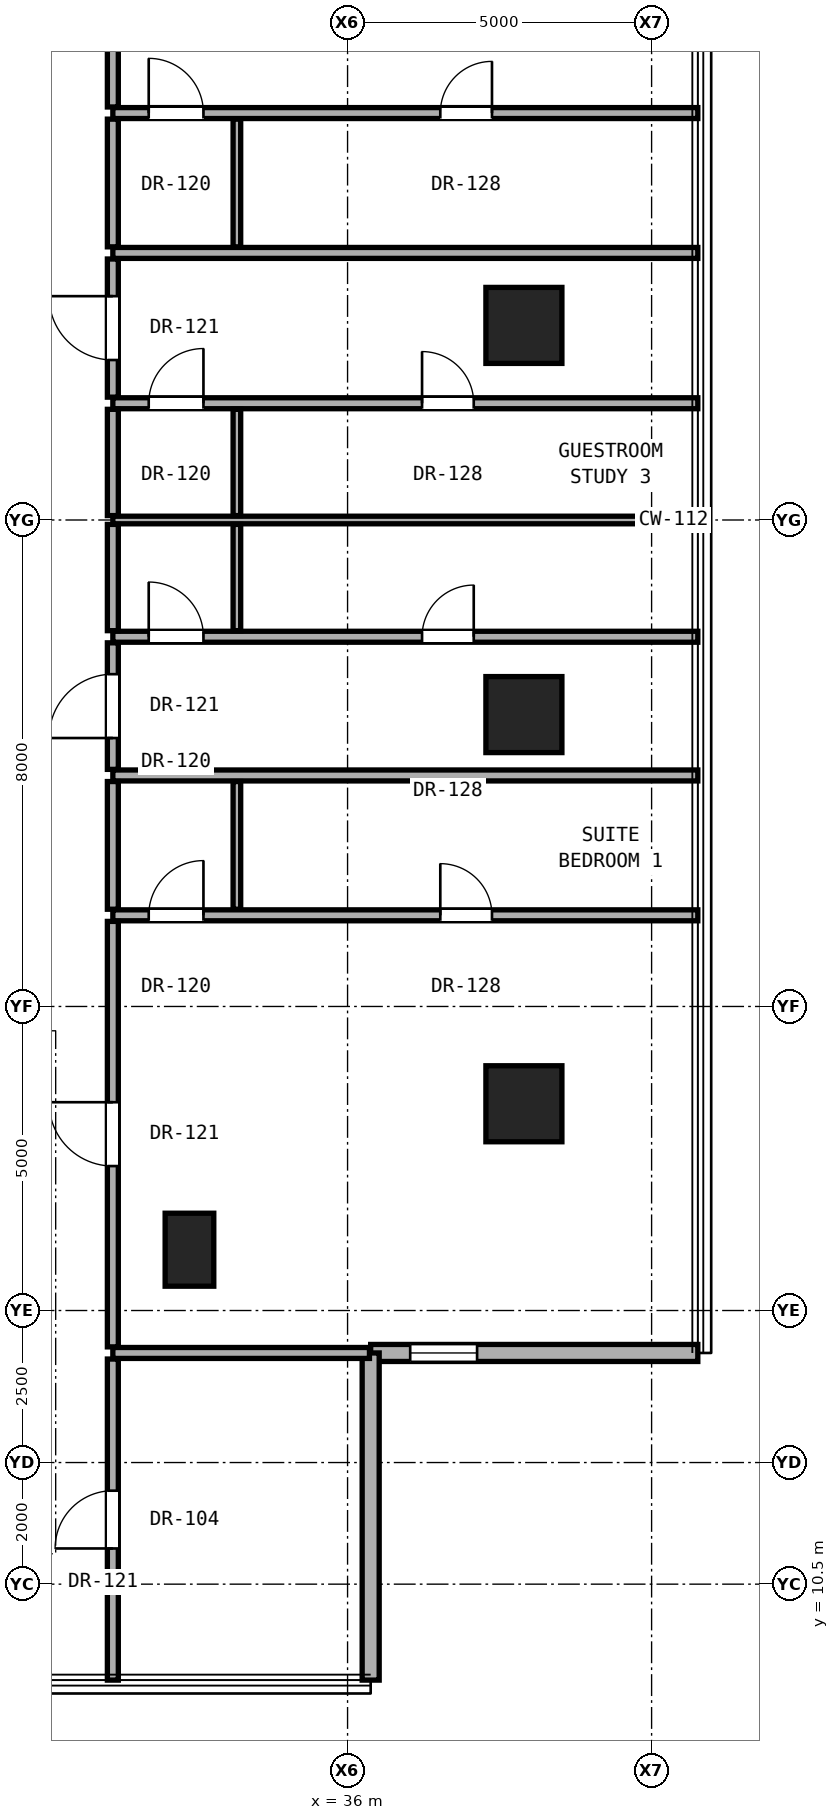
"""IFC4 building model, lengths in metres.
Left out: names, types, materials, properties, quantities, classifications, styles, units other than length and angle.
Written with IfcOpenShell. Run it as: python <this file> out.ifc"""

import sys

from ifc_helpers import new_model, si_unit, direction, frame, frame_2d, origin, origin_2d, place, context, subcontext, project, spatial, rectangle, hollow_rectangle, extrude, element, fill, save


model = new_model("IFC4")
c1 = context("Model", 3, precision=1e-05, world=origin(), true_north=direction((0.0, 1.0)))
c2 = subcontext(c1, "Body", "Model", "MODEL_VIEW")
j1 = project(units=[si_unit("LENGTHUNIT", "METRE"), si_unit("PLANEANGLEUNIT", "RADIAN")], contexts=[c1])
p1 = place(None, origin())
s1 = spatial("IfcSite", under=j1, at=p1, CompositionType="ELEMENT")
p2 = place(p1, origin())
s2 = spatial("IfcBuilding", under=s1, at=p2, CompositionType="ELEMENT")
p3 = place(p2, frame((0.0, 0.0, 25.7)))
s3 = spatial("IfcBuildingStorey", under=s2, at=p3, CompositionType="ELEMENT", Elevation=25.7)
for number, where, z_axis, x_axis in (
    (1, (38.9, 18.4, 0.0), (0.0, 0.0, 1.0), (1.0, 0.0, 0.0)),
    (2, (38.9, 24.8, 0.0), (0.0, 0.0, 1.0), (1.0, 0.0, 0.0)),
    (3, (38.9, 31.2, 0.0), (0.0, 0.0, 1.0), (1.0, 0.0, 0.0)),
):
    element("IfcColumn", number, at=place(p3, frame(where, z_axis=z_axis, x_axis=x_axis)), inside=s3, PredefinedType="COLUMN", context=c2, shape_type="SweptSolid", body=[
        extrude(hollow_rectangle(XDim=1.25, YDim=1.25, WallThickness=0.07, at=origin_2d()), origin(), (0.0, 0.0, 1.0), 3.3),
    ])
p4 = place(p3, frame((33.4, 16.0, 0.0), z_axis=(0.0, 0.0, 1.0), x_axis=(1.0, 0.0, 0.0)))
e4 = element("IfcColumn", 4, at=p4, inside=s3, PredefinedType="PILASTER", context=c2, shape_type="SweptSolid", body=[
    extrude(rectangle(XDim=0.8, YDim=1.2, at=origin_2d()), origin(), (0.0, 0.0, 1.0), 3.3),
])
p5 = place(p3, frame((36.38, 14.302, 0.0), z_axis=(0.0, 0.0, 1.0), x_axis=(1.0, 0.0, 0.0)))
e5 = element("IfcWall", 5, at=p5, inside=s3, PredefinedType="SOLIDWALL", context=c2, shape_type="SweptSolid", body=[
    extrude(rectangle(XDim=5.38, YDim=0.28, at=frame_2d((2.69, 0.0))), origin(), (0.0, 0.0, 1.0), 3.04),
])
p6 = place(p5, frame((0.65, 0.0, 0.85)))
e6 = element("IfcOpeningElement", 6, at=p6, cuts=e5, PredefinedType="OPENING", context=c2, shape_type="SweptSolid", body=[
    extrude(rectangle(XDim=1.1, YDim=2.0, at=frame_2d((0.55, 1.0))), frame((0.0, 0.15, 0.0), z_axis=(0.0, -1.0, 0.0), x_axis=(1.0, 0.0, 0.0)), (0.0, 0.0, 1.0), 0.3),
])
p7 = place(p3, frame((36.38, 8.922, 0.0), z_axis=(0.0, 0.0, 1.0), x_axis=(0.0, 1.0, 0.0)))
e7 = element("IfcWall", 7, at=p7, inside=s3, PredefinedType="SOLIDWALL", context=c2, shape_type="SweptSolid", body=[
    extrude(rectangle(XDim=5.38, YDim=0.28, at=frame_2d((2.69, 0.0))), origin(), (0.0, 0.0, 1.0), 3.04),
])
p8 = place(p3, frame((32.14, 14.302, 0.0), z_axis=(0.0, 0.0, 1.0), x_axis=(1.0, 0.0, 0.0)))
e8 = element("IfcWall", 8, at=p8, inside=s3, PredefinedType="PARTITIONING", context=c2, shape_type="SweptSolid", body=[
    extrude(rectangle(XDim=4.22, YDim=0.18, at=frame_2d((2.11, 0.0))), origin(), (0.0, 0.0, 1.0), 3.06),
])
p9 = place(p3, frame((32.14, 21.499, 0.0), z_axis=(0.0, 0.0, 1.0), x_axis=(1.0, 0.0, 0.0)))
e9 = element("IfcWall", 9, at=p9, inside=s3, PredefinedType="PARTITIONING", context=c2, shape_type="SweptSolid", body=[
    extrude(rectangle(XDim=9.62, YDim=0.18, at=frame_2d((4.81, 0.0))), origin(), (0.0, 0.0, 1.0), 2.125),
])
p10 = place(p9, frame((5.385, 0.0, 0.0)))
e10 = element("IfcOpeningElement", 10, at=p10, cuts=e9, PredefinedType="OPENING", context=c2, shape_type="SweptSolid", body=[
    extrude(rectangle(XDim=0.85, YDim=2.01, at=frame_2d((0.425, 1.005))), frame((0.0, 0.1, 0.0), z_axis=(0.0, -1.0, 0.0), x_axis=(1.0, 0.0, 0.0)), (0.0, 0.0, 1.0), 0.2),
])
p11 = place(p9, frame((0.59, 0.0, 0.0)))
e11 = element("IfcOpeningElement", 11, at=p11, cuts=e9, PredefinedType="OPENING", context=c2, shape_type="SweptSolid", body=[
    extrude(rectangle(XDim=0.9, YDim=2.1, at=frame_2d((0.45, 1.05))), frame((0.0, 0.1, 0.0), z_axis=(0.0, -1.0, 0.0), x_axis=(1.0, 0.0, 0.0)), (0.0, 0.0, 1.0), 0.2),
])
p12 = place(p3, frame((32.14, 23.799, 0.0), z_axis=(0.0, 0.0, 1.0), x_axis=(1.0, 0.0, 0.0)))
e12 = element("IfcWall", 12, at=p12, inside=s3, PredefinedType="PARTITIONING", context=c2, shape_type="SweptSolid", body=[
    extrude(rectangle(XDim=9.62, YDim=0.18, at=frame_2d((4.81, 0.0))), origin(), (0.0, 0.0, 1.0), 2.125),
])
p13 = place(p3, frame((32.14, 26.08, 0.0), z_axis=(0.0, 0.0, 1.0), x_axis=(1.0, 0.0, 0.0)))
e13 = element("IfcWall", 13, at=p13, inside=s3, PredefinedType="PARTITIONING", context=c2, shape_type="SweptSolid", body=[
    extrude(rectangle(XDim=9.62, YDim=0.18, at=frame_2d((4.81, 0.0))), origin(), (0.0, 0.0, 1.0), 2.125),
])
p14 = place(p13, frame((5.085, 0.0, 0.0)))
e14 = element("IfcOpeningElement", 14, at=p14, cuts=e13, PredefinedType="OPENING", context=c2, shape_type="SweptSolid", body=[
    extrude(rectangle(XDim=0.85, YDim=2.01, at=frame_2d((0.425, 1.005))), frame((0.0, 0.1, 0.0), z_axis=(0.0, -1.0, 0.0), x_axis=(1.0, 0.0, 0.0)), (0.0, 0.0, 1.0), 0.2),
])
p15 = place(p13, frame((0.59, 0.0, 0.0)))
e15 = element("IfcOpeningElement", 15, at=p15, cuts=e13, PredefinedType="OPENING", context=c2, shape_type="SweptSolid", body=[
    extrude(rectangle(XDim=0.9, YDim=2.1, at=frame_2d((0.45, 1.05))), frame((0.0, 0.1, 0.0), z_axis=(0.0, -1.0, 0.0), x_axis=(1.0, 0.0, 0.0)), (0.0, 0.0, 1.0), 0.2),
])
p16 = place(p3, frame((32.14, 28.0, 0.0), z_axis=(0.0, 0.0, 1.0), x_axis=(1.0, 0.0, 0.0)))
e16 = element("IfcWall", 16, at=p16, inside=s3, PredefinedType="PARTITIONING", context=c2, shape_type="SweptSolid", body=[
    extrude(rectangle(XDim=9.62, YDim=0.125, at=frame_2d((4.81, 0.0))), origin(), (0.0, 0.0, 1.0), 2.125),
])
p17 = place(p3, frame((32.14, 29.92, 0.0), z_axis=(0.0, 0.0, 1.0), x_axis=(1.0, 0.0, 0.0)))
e17 = element("IfcWall", 17, at=p17, inside=s3, PredefinedType="PARTITIONING", context=c2, shape_type="SweptSolid", body=[
    extrude(rectangle(XDim=9.62, YDim=0.18, at=frame_2d((4.81, 0.0))), origin(), (0.0, 0.0, 1.0), 2.125),
])
p18 = place(p17, frame((5.085, 0.0, 0.0)))
e18 = element("IfcOpeningElement", 18, at=p18, cuts=e17, PredefinedType="OPENING", context=c2, shape_type="SweptSolid", body=[
    extrude(rectangle(XDim=0.85, YDim=2.01, at=frame_2d((0.425, 1.005))), frame((0.0, 0.1, 0.0), z_axis=(0.0, -1.0, 0.0), x_axis=(1.0, 0.0, 0.0)), (0.0, 0.0, 1.0), 0.2),
])
p19 = place(p17, frame((0.59, 0.0, 0.0)))
e19 = element("IfcOpeningElement", 19, at=p19, cuts=e17, PredefinedType="OPENING", context=c2, shape_type="SweptSolid", body=[
    extrude(rectangle(XDim=0.9, YDim=2.1, at=frame_2d((0.45, 1.05))), frame((0.0, 0.1, 0.0), z_axis=(0.0, -1.0, 0.0), x_axis=(1.0, 0.0, 0.0)), (0.0, 0.0, 1.0), 0.2),
])
p20 = place(p3, frame((32.14, 32.392, 0.0), z_axis=(0.0, 0.0, 1.0), x_axis=(1.0, 0.0, 0.0)))
e20 = element("IfcWall", 20, at=p20, inside=s3, PredefinedType="PARTITIONING", context=c2, shape_type="SweptSolid", body=[
    extrude(rectangle(XDim=9.62, YDim=0.18, at=frame_2d((4.81, 0.0))), origin(), (0.0, 0.0, 1.0), 2.125),
])
p21 = place(p3, frame((32.14, 34.692, 0.0), z_axis=(0.0, 0.0, 1.0), x_axis=(1.0, 0.0, 0.0)))
e21 = element("IfcWall", 21, at=p21, inside=s3, PredefinedType="PARTITIONING", context=c2, shape_type="SweptSolid", body=[
    extrude(rectangle(XDim=9.62, YDim=0.18, at=frame_2d((4.81, 0.0))), origin(), (0.0, 0.0, 1.0), 2.125),
])
p22 = place(p21, frame((5.385, 0.0, 0.0)))
e22 = element("IfcOpeningElement", 22, at=p22, cuts=e21, PredefinedType="OPENING", context=c2, shape_type="SweptSolid", body=[
    extrude(rectangle(XDim=0.85, YDim=2.01, at=frame_2d((0.425, 1.005))), frame((0.0, 0.1, 0.0), z_axis=(0.0, -1.0, 0.0), x_axis=(1.0, 0.0, 0.0)), (0.0, 0.0, 1.0), 0.2),
])
p23 = place(p21, frame((0.59, 0.0, 0.0)))
e23 = element("IfcOpeningElement", 23, at=p23, cuts=e21, PredefinedType="OPENING", context=c2, shape_type="SweptSolid", body=[
    extrude(rectangle(XDim=0.9, YDim=2.1, at=frame_2d((0.45, 1.05))), frame((0.0, 0.1, 0.0), z_axis=(0.0, -1.0, 0.0), x_axis=(1.0, 0.0, 0.0)), (0.0, 0.0, 1.0), 0.2),
])
p24 = place(p3, frame((32.14, 8.922, 0.0), z_axis=(0.0, 0.0, 1.0), x_axis=(0.0, 1.0, 0.0)))
e24 = element("IfcWall", 24, at=p24, inside=s3, PredefinedType="PARTITIONING", context=c2, shape_type="SweptSolid", body=[
    extrude(rectangle(XDim=5.28, YDim=0.18, at=frame_2d((2.64, 0.0))), origin(), (0.0, 0.0, 1.0), 3.06),
])
p25 = place(p24, frame((2.165, 0.0, 0.0)))
e25 = element("IfcOpeningElement", 25, at=p25, cuts=e24, PredefinedType="OPENING", context=c2, shape_type="SweptSolid", body=[
    extrude(rectangle(XDim=0.95, YDim=2.15, at=frame_2d((0.475, 1.075))), frame((0.0, 0.1, 0.0), z_axis=(0.0, -1.0, 0.0), x_axis=(1.0, 0.0, 0.0)), (0.0, 0.0, 1.0), 0.2),
])
p26 = place(p3, frame((32.14, 14.402, 0.0), z_axis=(0.0, 0.0, 1.0), x_axis=(0.0, 1.0, 0.0)))
e26 = element("IfcWall", 26, at=p26, inside=s3, PredefinedType="PARTITIONING", context=c2, shape_type="SweptSolid", body=[
    extrude(rectangle(XDim=6.997, YDim=0.18, at=frame_2d((3.499, 0.0))), origin(), (0.0, 0.0, 1.0), 2.436),
])
p27 = place(p26, frame((2.973, 0.0, 0.0)))
e27 = element("IfcOpeningElement", 27, at=p27, cuts=e26, PredefinedType="OPENING", context=c2, shape_type="SweptSolid", body=[
    extrude(rectangle(XDim=1.05, YDim=2.2, at=frame_2d((0.525, 1.1))), frame((0.0, 0.1, 0.0), z_axis=(0.0, -1.0, 0.0), x_axis=(1.0, 0.0, 0.0)), (0.0, 0.0, 1.0), 0.2),
])
p28 = place(p3, frame((32.14, 21.599, 0.0), z_axis=(0.0, 0.0, 1.0), x_axis=(0.0, 1.0, 0.0)))
e28 = element("IfcWall", 28, at=p28, inside=s3, PredefinedType="PARTITIONING", context=c2, shape_type="SweptSolid", body=[
    extrude(rectangle(XDim=2.1, YDim=0.18, at=frame_2d((1.05, 0.0))), origin(), (0.0, 0.0, 1.0), 3.06),
])
p29 = place(p3, frame((32.14, 23.899, 0.0), z_axis=(0.0, 0.0, 1.0), x_axis=(0.0, 1.0, 0.0)))
e29 = element("IfcWall", 29, at=p29, inside=s3, PredefinedType="PARTITIONING", context=c2, shape_type="SweptSolid", body=[
    extrude(rectangle(XDim=2.081, YDim=0.18, at=frame_2d((1.041, 0.0))), origin(), (0.0, 0.0, 1.0), 2.279),
])
p30 = place(p29, frame((0.515, 0.0, 0.0)))
e30 = element("IfcOpeningElement", 30, at=p30, cuts=e29, PredefinedType="OPENING", context=c2, shape_type="SweptSolid", body=[
    extrude(rectangle(XDim=1.05, YDim=2.2, at=frame_2d((0.525, 1.1))), frame((0.0, 0.1, 0.0), z_axis=(0.0, -1.0, 0.0), x_axis=(1.0, 0.0, 0.0)), (0.0, 0.0, 1.0), 0.2),
])
for number, where, z_axis, x_axis in (
    (31, (32.14, 26.18, 0.0), (0.0, 0.0, 1.0), (0.0, 1.0, 0.0)),
    (32, (32.14, 28.073, 0.0), (0.0, 0.0, 1.0), (0.0, 1.0, 0.0)),
):
    element("IfcWall", number, at=place(p3, frame(where, z_axis=z_axis, x_axis=x_axis)), inside=s3, PredefinedType="PARTITIONING", context=c2, shape_type="SweptSolid", body=[
        extrude(rectangle(XDim=1.748, YDim=0.18, at=frame_2d((0.874, 0.0))), origin(), (0.0, 0.0, 1.0), 3.06),
    ])
p31 = place(p3, frame((32.14, 30.02, 0.0), z_axis=(0.0, 0.0, 1.0), x_axis=(0.0, 1.0, 0.0)))
e33 = element("IfcWall", 33, at=p31, inside=s3, PredefinedType="PARTITIONING", context=c2, shape_type="SweptSolid", body=[
    extrude(rectangle(XDim=2.272, YDim=0.18, at=frame_2d((1.136, 0.0))), origin(), (0.0, 0.0, 1.0), 2.279),
])
p32 = place(p31, frame((0.611, 0.0, 0.0)))
e34 = element("IfcOpeningElement", 34, at=p32, cuts=e33, PredefinedType="OPENING", context=c2, shape_type="SweptSolid", body=[
    extrude(rectangle(XDim=1.05, YDim=2.2, at=frame_2d((0.525, 1.1))), frame((0.0, 0.1, 0.0), z_axis=(0.0, -1.0, 0.0), x_axis=(1.0, 0.0, 0.0)), (0.0, 0.0, 1.0), 0.2),
])
p33 = place(p3, frame((32.14, 32.492, 0.0), z_axis=(0.0, 0.0, 1.0), x_axis=(0.0, 1.0, 0.0)))
e35 = element("IfcWall", 35, at=p33, inside=s3, PredefinedType="PARTITIONING", context=c2, shape_type="SweptSolid", body=[
    extrude(rectangle(XDim=2.1, YDim=0.18, at=frame_2d((1.05, 0.0))), origin(), (0.0, 0.0, 1.0), 3.06),
])
p34 = place(p3, frame((32.14, 34.792, 0.0), z_axis=(0.0, 0.0, 1.0), x_axis=(0.0, 1.0, 0.0)))
e36 = element("IfcWall", 36, at=p34, inside=s3, PredefinedType="PARTITIONING", context=c2, shape_type="SweptSolid", body=[
    extrude(rectangle(XDim=6.806, YDim=0.18, at=frame_2d((3.403, 0.0))), origin(), (0.0, 0.0, 1.0), 2.436),
])
p35 = place(p34, frame((2.878, 0.0, 0.0)))
e37 = element("IfcOpeningElement", 37, at=p35, cuts=e36, PredefinedType="OPENING", context=c2, shape_type="SweptSolid", body=[
    extrude(rectangle(XDim=1.05, YDim=2.2, at=frame_2d((0.525, 1.1))), frame((0.0, 0.1, 0.0), z_axis=(0.0, -1.0, 0.0), x_axis=(1.0, 0.0, 0.0)), (0.0, 0.0, 1.0), 0.2),
])
p36 = place(p3, frame((34.18, 21.599, 0.0), z_axis=(0.0, 0.0, 1.0), x_axis=(0.0, 1.0, 0.0)))
e38 = element("IfcWall", 38, at=p36, inside=s3, PredefinedType="PARTITIONING", context=c2, shape_type="SweptSolid", body=[
    extrude(rectangle(XDim=2.1, YDim=0.125, at=frame_2d((1.05, 0.0))), origin(), (0.0, 0.0, 1.0), 3.06),
])
for number, where, z_axis, x_axis in (
    (39, (34.18, 26.18, 0.0), (0.0, 0.0, 1.0), (0.0, 1.0, 0.0)),
    (40, (34.18, 28.073, 0.0), (0.0, 0.0, 1.0), (0.0, 1.0, 0.0)),
):
    element("IfcWall", number, at=place(p3, frame(where, z_axis=z_axis, x_axis=x_axis)), inside=s3, PredefinedType="PARTITIONING", context=c2, shape_type="SweptSolid", body=[
        extrude(rectangle(XDim=1.748, YDim=0.125, at=frame_2d((0.874, 0.0))), origin(), (0.0, 0.0, 1.0), 3.06),
    ])
p37 = place(p3, frame((34.18, 32.492, 0.0), z_axis=(0.0, 0.0, 1.0), x_axis=(0.0, 1.0, 0.0)))
e41 = element("IfcWall", 41, at=p37, inside=s3, PredefinedType="PARTITIONING", context=c2, shape_type="SweptSolid", body=[
    extrude(rectangle(XDim=2.1, YDim=0.125, at=frame_2d((1.05, 0.0))), origin(), (0.0, 0.0, 1.0), 3.06),
])
p38 = place(p6, origin())
e42 = element("IfcWindow", 42, at=p38, inside=s3, PartitioningType="SINGLE_PANEL", PredefinedType="WINDOW", context=c2, shape_type="SweptSolid", body=[
    extrude(rectangle(XDim=1.1, YDim=2.0, at=frame_2d((0.55, 1.0))), frame((0.0, 0.03, 0.0), z_axis=(0.0, -1.0, 0.0), x_axis=(1.0, 0.0, 0.0)), (0.0, 0.0, 1.0), 0.06),
])
fill(e6, e42)
p39 = place(p27, origin())
e43 = element("IfcDoor", 43, at=p39, inside=s3, OperationType="SINGLE_SWING_RIGHT", PredefinedType="DOOR", context=c2, shape_type="SweptSolid", body=[
    extrude(rectangle(XDim=1.05, YDim=2.2, at=frame_2d((0.525, 1.1))), frame((0.0, 0.025, 0.0), z_axis=(0.0, -1.0, 0.0), x_axis=(1.0, 0.0, 0.0)), (0.0, 0.0, 1.0), 0.05),
])
fill(e27, e43)
p40 = place(p10, origin())
e44 = element("IfcDoor", 44, at=p40, inside=s3, OperationType="SINGLE_SWING_LEFT", PredefinedType="DOOR", context=c2, shape_type="SweptSolid", body=[
    extrude(rectangle(XDim=0.85, YDim=2.01, at=frame_2d((0.425, 1.005))), frame((0.0, 0.025, 0.0), z_axis=(0.0, -1.0, 0.0), x_axis=(1.0, 0.0, 0.0)), (0.0, 0.0, 1.0), 0.05),
])
fill(e10, e44)
p41 = place(p11, origin())
e45 = element("IfcDoor", 45, at=p41, inside=s3, OperationType="SINGLE_SWING_RIGHT", PredefinedType="DOOR", context=c2, shape_type="SweptSolid", body=[
    extrude(rectangle(XDim=0.9, YDim=2.1, at=frame_2d((0.45, 1.05))), frame((0.0, 0.025, 0.0), z_axis=(0.0, -1.0, 0.0), x_axis=(1.0, 0.0, 0.0)), (0.0, 0.0, 1.0), 0.05),
])
fill(e11, e45)
p42 = place(p30, origin())
e46 = element("IfcDoor", 46, at=p42, inside=s3, OperationType="SINGLE_SWING_LEFT", PredefinedType="DOOR", context=c2, shape_type="SweptSolid", body=[
    extrude(rectangle(XDim=1.05, YDim=2.2, at=frame_2d((0.525, 1.1))), frame((0.0, 0.025, 0.0), z_axis=(0.0, -1.0, 0.0), x_axis=(1.0, 0.0, 0.0)), (0.0, 0.0, 1.0), 0.05),
])
fill(e30, e46)
p43 = place(p14, origin())
e47 = element("IfcDoor", 47, at=p43, inside=s3, OperationType="SINGLE_SWING_RIGHT", PredefinedType="DOOR", context=c2, shape_type="SweptSolid", body=[
    extrude(rectangle(XDim=0.85, YDim=2.01, at=frame_2d((0.425, 1.005))), frame((0.0, 0.025, 0.0), z_axis=(0.0, -1.0, 0.0), x_axis=(1.0, 0.0, 0.0)), (0.0, 0.0, 1.0), 0.05),
])
fill(e14, e47)
p44 = place(p15, origin())
e48 = element("IfcDoor", 48, at=p44, inside=s3, OperationType="SINGLE_SWING_LEFT", PredefinedType="DOOR", context=c2, shape_type="SweptSolid", body=[
    extrude(rectangle(XDim=0.9, YDim=2.1, at=frame_2d((0.45, 1.05))), frame((0.0, 0.025, 0.0), z_axis=(0.0, -1.0, 0.0), x_axis=(1.0, 0.0, 0.0)), (0.0, 0.0, 1.0), 0.05),
])
fill(e15, e48)
p45 = place(p32, origin())
e49 = element("IfcDoor", 49, at=p45, inside=s3, OperationType="SINGLE_SWING_RIGHT", PredefinedType="DOOR", context=c2, shape_type="SweptSolid", body=[
    extrude(rectangle(XDim=1.05, YDim=2.2, at=frame_2d((0.525, 1.1))), frame((0.0, 0.025, 0.0), z_axis=(0.0, -1.0, 0.0), x_axis=(1.0, 0.0, 0.0)), (0.0, 0.0, 1.0), 0.05),
])
fill(e34, e49)
p46 = place(p18, origin())
e50 = element("IfcDoor", 50, at=p46, inside=s3, OperationType="SINGLE_SWING_LEFT", PredefinedType="DOOR", context=c2, shape_type="SweptSolid", body=[
    extrude(rectangle(XDim=0.85, YDim=2.01, at=frame_2d((0.425, 1.005))), frame((0.0, 0.025, 0.0), z_axis=(0.0, -1.0, 0.0), x_axis=(1.0, 0.0, 0.0)), (0.0, 0.0, 1.0), 0.05),
])
fill(e18, e50)
p47 = place(p19, origin())
e51 = element("IfcDoor", 51, at=p47, inside=s3, OperationType="SINGLE_SWING_RIGHT", PredefinedType="DOOR", context=c2, shape_type="SweptSolid", body=[
    extrude(rectangle(XDim=0.9, YDim=2.1, at=frame_2d((0.45, 1.05))), frame((0.0, 0.025, 0.0), z_axis=(0.0, -1.0, 0.0), x_axis=(1.0, 0.0, 0.0)), (0.0, 0.0, 1.0), 0.05),
])
fill(e19, e51)
p48 = place(p22, origin())
e52 = element("IfcDoor", 52, at=p48, inside=s3, OperationType="SINGLE_SWING_RIGHT", PredefinedType="DOOR", context=c2, shape_type="SweptSolid", body=[
    extrude(rectangle(XDim=0.85, YDim=2.01, at=frame_2d((0.425, 1.005))), frame((0.0, 0.025, 0.0), z_axis=(0.0, -1.0, 0.0), x_axis=(1.0, 0.0, 0.0)), (0.0, 0.0, 1.0), 0.05),
])
fill(e22, e52)
p49 = place(p23, origin())
e53 = element("IfcDoor", 53, at=p49, inside=s3, OperationType="SINGLE_SWING_LEFT", PredefinedType="DOOR", context=c2, shape_type="SweptSolid", body=[
    extrude(rectangle(XDim=0.9, YDim=2.1, at=frame_2d((0.45, 1.05))), frame((0.0, 0.025, 0.0), z_axis=(0.0, -1.0, 0.0), x_axis=(1.0, 0.0, 0.0)), (0.0, 0.0, 1.0), 0.05),
])
fill(e23, e53)
p50 = place(p25, origin())
e54 = element("IfcDoor", 54, at=p50, inside=s3, OperationType="SINGLE_SWING_LEFT", PredefinedType="DOOR", context=c2, shape_type="SweptSolid", body=[
    extrude(rectangle(XDim=0.95, YDim=2.15, at=frame_2d((0.475, 1.075))), frame((0.0, 0.025, 0.0), z_axis=(0.0, -1.0, 0.0), x_axis=(1.0, 0.0, 0.0)), (0.0, 0.0, 1.0), 0.05),
])
fill(e25, e54)
save(model, sys.argv[1])
